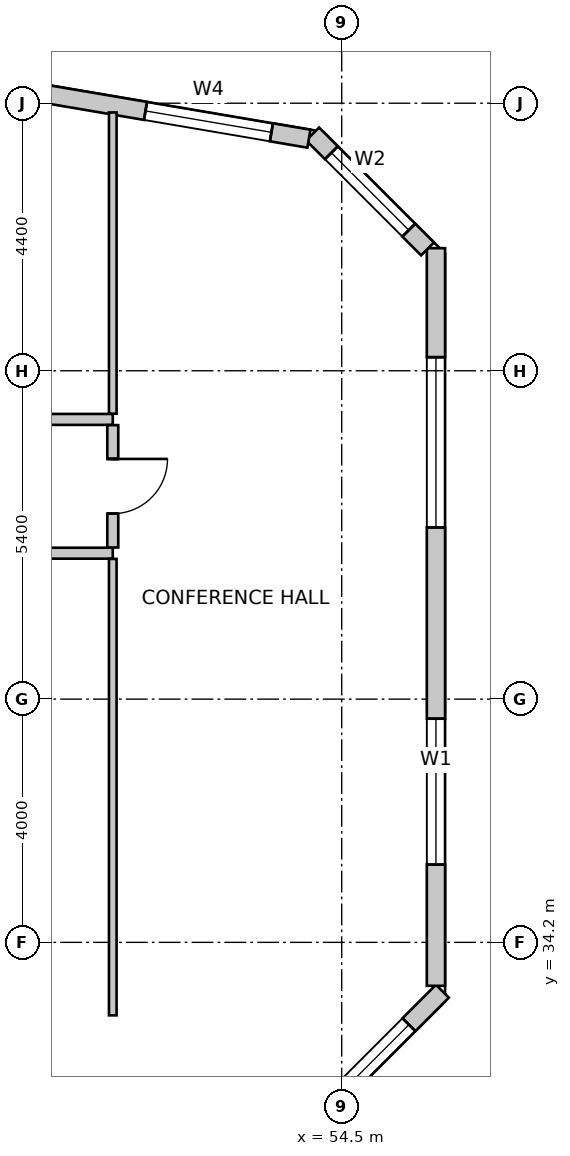
"""IFC4 building model, lengths in metres.
Left out: names, types, materials, properties, quantities, classifications, styles, units other than length and angle.
Written with IfcOpenShell. Run it as: python <this file> out.ifc"""

import sys

from ifc_helpers import new_model, si_unit, direction, frame, frame_2d, origin, place, context, subcontext, project, spatial, rectangle, extrude, source, transform, mapped, element, fill, save


model = new_model("IFC4")
c1 = context("Model", 3, precision=1e-05, world=origin(), true_north=direction((0.0, 1.0)))
c2 = subcontext(c1, "Body", "Model", "MODEL_VIEW")
j1 = project(units=[si_unit("LENGTHUNIT", "METRE"), si_unit("PLANEANGLEUNIT", "RADIAN")], contexts=[c1])
p1 = place(None, origin())
s1 = spatial("IfcSite", under=j1, at=p1, CompositionType="ELEMENT")
p2 = place(p1, origin())
s2 = spatial("IfcBuilding", under=s1, at=p2, CompositionType="ELEMENT")
p3 = place(p2, frame((0.0, 0.0, 63.0)))
s3 = spatial("IfcBuildingStorey", under=s2, at=p3, CompositionType="ELEMENT", Elevation=63.0)
p4 = place(p3, frame((53.076, 30.316, 0.0), z_axis=(0.0, 0.0, 1.0), x_axis=(0.707078757535, 0.707134803727, 0.0)))
e1 = element("IfcWall", 1, at=p4, inside=s3, PredefinedType="SOLIDWALL", context=c2, shape_type="SweptSolid", body=[
    extrude(rectangle(XDim=4.356, YDim=0.3, at=frame_2d((2.178, 0.0))), origin(), (0.0, 0.0, 1.0), 3.75),
])
m1 = source(origin(), c2, "Body", "SweptSolid", [
    extrude(rectangle(XDim=2.8, YDim=2.4, at=frame_2d((1.4, 1.2))), frame((0.0, 0.16, 0.0), z_axis=(0.0, -1.0, 0.0), x_axis=(1.0, 0.0, 0.0)), (0.0, 0.0, 1.0), 0.32),
])
p5 = place(p4, frame((0.778, 0.0, 0.85)))
e2 = element("IfcOpeningElement", 2, at=p5, cuts=e1, PredefinedType="OPENING", context=c2, shape_type="MappedRepresentation", body=[
    mapped(m1, transform((0.0, 0.0, 0.0), scale=1.0)),
])
p6 = place(p3, frame((56.05, 33.485, 0.0), z_axis=(0.0, 0.0, 1.0), x_axis=(0.0, 1.0, 0.0)))
e3 = element("IfcWall", 3, at=p6, inside=s3, PredefinedType="SOLIDWALL", context=c2, shape_type="SweptSolid", body=[
    extrude(rectangle(XDim=12.131, YDim=0.3, at=frame_2d((6.065, 0.0))), origin(), (0.0, 0.0, 1.0), 3.75),
])
m2 = source(origin(), c2, "Body", "SweptSolid", [
    extrude(rectangle(XDim=2.4, YDim=2.2, at=frame_2d((1.2, 1.1))), frame((0.0, 0.16, 0.0), z_axis=(0.0, -1.0, 0.0), x_axis=(1.0, 0.0, 0.0)), (0.0, 0.0, 1.0), 0.32),
])
p7 = place(p6, frame((1.993, 0.0, 0.85)))
e4 = element("IfcOpeningElement", 4, at=p7, cuts=e3, PredefinedType="OPENING", context=c2, shape_type="MappedRepresentation", body=[
    mapped(m2, transform((0.0, 0.0, 0.0), scale=1.0)),
])
p8 = place(p6, frame((7.538, 0.0, 0.85)))
e5 = element("IfcOpeningElement", 5, at=p8, cuts=e3, PredefinedType="OPENING", context=c2, shape_type="MappedRepresentation", body=[
    mapped(m1, transform((0.0, 0.0, 0.0), scale=1.0)),
])
p9 = place(p3, frame((55.912, 45.604, 0.0), z_axis=(0.0, 0.0, 1.0), x_axis=(-0.707152443695, 0.707061115729, 0.0)))
e6 = element("IfcWall", 6, at=p9, inside=s3, PredefinedType="SOLIDWALL", context=c2, shape_type="SweptSolid", body=[
    extrude(rectangle(XDim=2.673, YDim=0.3, at=frame_2d((1.337, 0.0))), origin(), (0.0, 0.0, 1.0), 3.75),
])
m3 = source(origin(), c2, "Body", "SweptSolid", [
    extrude(rectangle(XDim=1.8, YDim=2.1, at=frame_2d((0.9, 1.05))), frame((0.0, 0.16, 0.0), z_axis=(0.0, -1.0, 0.0), x_axis=(1.0, 0.0, 0.0)), (0.0, 0.0, 1.0), 0.32),
])
p10 = place(p9, frame((0.437, 0.0, 0.85)))
e7 = element("IfcOpeningElement", 7, at=p10, cuts=e6, PredefinedType="OPENING", context=c2, shape_type="MappedRepresentation", body=[
    mapped(m3, transform((0.0, 0.0, 0.0), scale=1.0)),
])
p11 = place(p3, frame((53.961, 47.417, 0.0), z_axis=(0.0, 0.0, 1.0), x_axis=(-0.985865713455, 0.167537443678, 0.0)))
e8 = element("IfcWall", 8, at=p11, inside=s3, PredefinedType="SOLIDWALL", context=c2, shape_type="SweptSolid", body=[
    extrude(rectangle(XDim=32.537, YDim=0.3, at=frame_2d((16.269, 0.0))), origin(), (0.0, 0.0, 1.0), 3.75),
])
m4 = source(origin(), c2, "Body", "SweptSolid", [
    extrude(rectangle(XDim=2.1, YDim=2.0, at=frame_2d((1.05, 1.0))), frame((0.0, 0.16, 0.0), z_axis=(0.0, -1.0, 0.0), x_axis=(1.0, 0.0, 0.0)), (0.0, 0.0, 1.0), 0.32),
])
p12 = place(p11, frame((0.626, 0.0, 0.85)))
e9 = element("IfcOpeningElement", 9, at=p12, cuts=e8, PredefinedType="OPENING", context=c2, shape_type="MappedRepresentation", body=[
    mapped(m4, transform((0.0, 0.0, 0.0), scale=1.0)),
])
p13 = place(p11, frame((4.504, 0.0, 0.85)))
e10 = element("IfcOpeningElement", 10, at=p13, cuts=e8, PredefinedType="OPENING", context=c2, shape_type="MappedRepresentation", body=[
    mapped(m2, transform((0.0, 0.0, 0.0), scale=1.0)),
])
p14 = place(p11, frame((8.768, 0.0, 0.85)))
e11 = element("IfcOpeningElement", 11, at=p14, cuts=e8, PredefinedType="OPENING", context=c2, shape_type="MappedRepresentation", body=[
    mapped(m1, transform((0.0, 0.0, 0.0), scale=1.0)),
])
p15 = place(p11, frame((14.234, 0.0, 0.85)))
e12 = element("IfcOpeningElement", 12, at=p15, cuts=e8, PredefinedType="OPENING", context=c2, shape_type="MappedRepresentation", body=[
    mapped(m2, transform((0.0, 0.0, 0.0), scale=1.0)),
])
p16 = place(p11, frame((19.222, 0.0, 0.85)))
e13 = element("IfcOpeningElement", 13, at=p16, cuts=e8, PredefinedType="OPENING", context=c2, shape_type="MappedRepresentation", body=[
    mapped(m1, transform((0.0, 0.0, 0.0), scale=1.0)),
])
p17 = place(p11, frame((25.095, 0.0, 0.85)))
e14 = element("IfcOpeningElement", 14, at=p17, cuts=e8, PredefinedType="OPENING", context=c2, shape_type="MappedRepresentation", body=[
    mapped(m2, transform((0.0, 0.0, 0.0), scale=1.0)),
])
p18 = place(p11, frame((29.595, 0.0, 0.85)))
e15 = element("IfcOpeningElement", 15, at=p18, cuts=e8, PredefinedType="OPENING", context=c2, shape_type="MappedRepresentation", body=[
    mapped(m2, transform((0.0, 0.0, 0.0), scale=1.0)),
])
p19 = place(p3, frame((50.735, 40.6, 0.0), z_axis=(0.0, 0.0, 1.0), x_axis=(-1.0, 0.0, 0.0)))
e16 = element("IfcWall", 16, at=p19, inside=s3, PredefinedType="PARTITIONING", context=c2, shape_type="SweptSolid", body=[
    extrude(rectangle(XDim=5.483, YDim=0.18, at=frame_2d((2.742, 0.0))), origin(), (0.0, 0.0, 1.0), 3.125),
])
m5 = source(origin(), c2, "Body", "SweptSolid", [
    extrude(rectangle(XDim=0.9, YDim=2.15, at=frame_2d((0.45, 1.075))), frame((0.0, 0.1, 0.0), z_axis=(0.0, -1.0, 0.0), x_axis=(1.0, 0.0, 0.0)), (0.0, 0.0, 1.0), 0.2),
])
p20 = place(p19, frame((4.181, 0.0, 0.0)))
e17 = element("IfcOpeningElement", 17, at=p20, cuts=e16, PredefinedType="OPENING", context=c2, shape_type="MappedRepresentation", body=[
    mapped(m5, transform((0.0, 0.0, 0.0), scale=1.0)),
])
p21 = place(p3, frame((41.662, 42.8, 0.0), z_axis=(0.0, 0.0, 1.0), x_axis=(1.0, 0.0, 0.0)))
e18 = element("IfcWall", 18, at=p21, inside=s3, PredefinedType="PARTITIONING", context=c2, shape_type="SweptSolid", body=[
    extrude(rectangle(XDim=9.073, YDim=0.18, at=frame_2d((4.537, 0.0))), origin(), (0.0, 0.0, 1.0), 3.125),
])
p22 = place(p21, frame((4.026, 0.0, 0.0)))
e19 = element("IfcOpeningElement", 19, at=p22, cuts=e18, PredefinedType="OPENING", context=c2, shape_type="MappedRepresentation", body=[
    mapped(m5, transform((0.0, 0.0, 0.0), scale=1.0)),
])
p23 = place(p3, frame((50.735, 42.706, 0.0), z_axis=(0.0, 0.0, 1.0), x_axis=(0.0, -1.0, 0.0)))
e20 = element("IfcWall", 20, at=p23, inside=s3, PredefinedType="PARTITIONING", context=c2, shape_type="SweptSolid", body=[
    extrude(rectangle(XDim=2.012, YDim=0.18, at=frame_2d((1.006, 0.0))), origin(), (0.0, 0.0, 1.0), 3.75),
])
p24 = place(p23, frame((0.556, 0.0, 0.0)))
e21 = element("IfcOpeningElement", 21, at=p24, cuts=e20, PredefinedType="OPENING", context=c2, shape_type="MappedRepresentation", body=[
    mapped(m5, transform((0.0, 0.0, 0.0), scale=1.0)),
])
p25 = place(p3, frame((50.735, 40.506, 0.0), z_axis=(0.0, 0.0, 1.0), x_axis=(0.0, -1.0, 0.0)))
e22 = element("IfcWall", 22, at=p25, inside=s3, PredefinedType="PARTITIONING", context=c2, shape_type="SweptSolid", body=[
    extrude(rectangle(XDim=7.506, YDim=0.125, at=frame_2d((3.753, 0.0))), origin(), (0.0, 0.0, 1.0), 3.75),
])
p26 = place(p3, frame((50.735, 47.848, 0.0), z_axis=(0.0, 0.0, 1.0), x_axis=(0.0, -1.0, 0.0)))
e23 = element("IfcWall", 23, at=p26, inside=s3, PredefinedType="PARTITIONING", context=c2, shape_type="SweptSolid", body=[
    extrude(rectangle(XDim=4.954, YDim=0.125, at=frame_2d((2.477, 0.0))), origin(), (0.0, 0.0, 1.0), 3.75),
])
m6 = source(origin(), c2, "Body", "SweptSolid", [
    extrude(rectangle(XDim=2.8, YDim=2.4, at=frame_2d((1.4, 1.2))), frame((0.0, -0.015, 0.0), z_axis=(0.0, -1.0, 0.0), x_axis=(1.0, 0.0, 0.0)), (0.0, 0.0, 1.0), 0.06),
])
p27 = place(p5, origin())
e24 = element("IfcWindow", 24, at=p27, inside=s3, PartitioningType="SINGLE_PANEL", PredefinedType="WINDOW", context=c2, shape_type="MappedRepresentation", body=[
    mapped(m6, transform((0.0, 0.0, 0.0), scale=1.0)),
])
fill(e2, e24)
m7 = source(origin(), c2, "Body", "SweptSolid", [
    extrude(rectangle(XDim=2.4, YDim=2.2, at=frame_2d((1.2, 1.1))), frame((0.0, -0.015, 0.0), z_axis=(0.0, -1.0, 0.0), x_axis=(1.0, 0.0, 0.0)), (0.0, 0.0, 1.0), 0.06),
])
p28 = place(p7, origin())
e25 = element("IfcWindow", 25, at=p28, inside=s3, PartitioningType="SINGLE_PANEL", PredefinedType="WINDOW", context=c2, shape_type="MappedRepresentation", body=[
    mapped(m7, transform((0.0, 0.0, 0.0), scale=1.0)),
])
fill(e4, e25)
p29 = place(p8, origin())
e26 = element("IfcWindow", 26, at=p29, inside=s3, PartitioningType="SINGLE_PANEL", PredefinedType="WINDOW", context=c2, shape_type="MappedRepresentation", body=[
    mapped(m6, transform((0.0, 0.0, 0.0), scale=1.0)),
])
fill(e5, e26)
m8 = source(origin(), c2, "Body", "SweptSolid", [
    extrude(rectangle(XDim=1.8, YDim=2.1, at=frame_2d((0.9, 1.05))), frame((0.0, -0.015, 0.0), z_axis=(0.0, -1.0, 0.0), x_axis=(1.0, 0.0, 0.0)), (0.0, 0.0, 1.0), 0.06),
])
p30 = place(p10, origin())
e27 = element("IfcWindow", 27, at=p30, inside=s3, PartitioningType="SINGLE_PANEL", PredefinedType="WINDOW", context=c2, shape_type="MappedRepresentation", body=[
    mapped(m8, transform((0.0, 0.0, 0.0), scale=1.0)),
])
fill(e7, e27)
m9 = source(origin(), c2, "Body", "SweptSolid", [
    extrude(rectangle(XDim=2.1, YDim=2.0, at=frame_2d((1.05, 1.0))), frame((0.0, -0.015, 0.0), z_axis=(0.0, -1.0, 0.0), x_axis=(1.0, 0.0, 0.0)), (0.0, 0.0, 1.0), 0.06),
])
p31 = place(p12, origin())
e28 = element("IfcWindow", 28, at=p31, inside=s3, PartitioningType="SINGLE_PANEL", PredefinedType="WINDOW", context=c2, shape_type="MappedRepresentation", body=[
    mapped(m9, transform((0.0, 0.0, 0.0), scale=1.0)),
])
fill(e9, e28)
m10 = source(origin(), c2, "Body", "SweptSolid", [
    extrude(rectangle(XDim=0.9, YDim=2.15, at=frame_2d((0.45, 1.075))), frame((0.0, 0.025, 0.0), z_axis=(0.0, -1.0, 0.0), x_axis=(1.0, 0.0, 0.0)), (0.0, 0.0, 1.0), 0.05),
])
p32 = place(p24, origin())
e29 = element("IfcDoor", 29, at=p32, inside=s3, OperationType="SINGLE_SWING_LEFT", PredefinedType="DOOR", context=c2, shape_type="MappedRepresentation", body=[
    mapped(m10, transform((0.0, 0.0, 0.0), scale=1.0)),
])
fill(e21, e29)
save(model, sys.argv[1])
